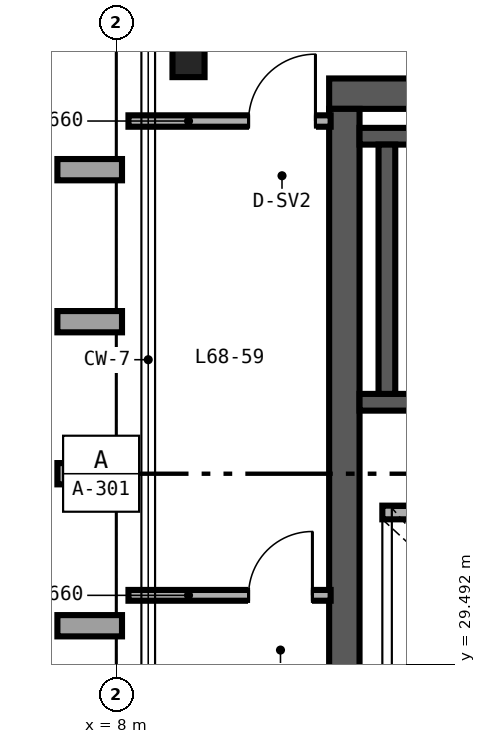
"""IFC4 building model, lengths in metres.
Left out: names, types, materials, properties, quantities, classifications, styles, units other than length and angle.
Written with IfcOpenShell. Run it as: python <this file> out.ifc"""

import sys

from ifc_helpers import new_model, si_unit, direction, frame, frame_2d, origin, origin_2d, place, context, subcontext, project, spatial, rectangle, i_section, extrude, source, transform, mapped, element, fill, save


model = new_model("IFC4")
c1 = context("Model", 3, precision=1e-05, world=origin(), true_north=direction((0.0, 1.0)))
c2 = subcontext(c1, "Body", "Model", "MODEL_VIEW")
j1 = project(units=[si_unit("LENGTHUNIT", "METRE"), si_unit("PLANEANGLEUNIT", "RADIAN")], contexts=[c1])
p1 = place(None, origin())
s1 = spatial("IfcSite", under=j1, at=p1, CompositionType="ELEMENT")
p2 = place(p1, origin())
s2 = spatial("IfcBuilding", under=s1, at=p2, CompositionType="ELEMENT")
p3 = place(p2, frame((0.0, 0.0, 268.8)))
s3 = spatial("IfcBuildingStorey", under=s2, at=p3, CompositionType="ELEMENT", Elevation=268.8)
p4 = place(p3, frame((10.8, 37.0, 0.0), z_axis=(0.0, 0.0, 1.0), x_axis=(1.0, 0.0, 0.0)))
e1 = element("IfcWall", 1, at=p4, inside=s3, PredefinedType="SHEAR", context=c2, shape_type="SweptSolid", body=[
    extrude(rectangle(XDim=12.4, YDim=0.4, at=frame_2d((6.2, 0.0))), origin(), (0.0, 0.0, 1.0), 3.28),
])
p5 = place(p4, frame((10.3, 0.0, 0.0)))
e2 = element("IfcOpeningElement", 2, at=p5, cuts=e1, PredefinedType="OPENING", context=c2, shape_type="SweptSolid", body=[
    extrude(rectangle(XDim=1.0, YDim=2.15, at=frame_2d((0.5, 1.075))), frame((0.0, 0.21, 0.0), z_axis=(0.0, -1.0, 0.0), x_axis=(1.0, 0.0, 0.0)), (0.0, 0.0, 1.0), 0.42),
])
p6 = place(p3, frame((11.0, 15.2, 0.0), z_axis=(0.0, 0.0, 1.0), x_axis=(0.0, 1.0, 0.0)))
e3 = element("IfcWall", 3, at=p6, inside=s3, PredefinedType="SHEAR", context=c2, shape_type="SweptSolid", body=[
    extrude(rectangle(XDim=21.6, YDim=0.4, at=frame_2d((10.8, 0.0))), origin(), (0.0, 0.0, 1.0), 3.28),
])
p7 = place(p3, frame((11.2, 32.94, 0.0), z_axis=(0.0, 0.0, 1.0), x_axis=(1.0, 0.0, 0.0)))
e4 = element("IfcWall", 4, at=p7, inside=s3, PredefinedType="SHEAR", context=c2, shape_type="SweptSolid", body=[
    extrude(rectangle(XDim=8.11, YDim=0.22, at=frame_2d((4.055, 0.0))), origin(), (0.0, 0.0, 1.0), 3.4),
])
p8 = place(p7, frame((0.72, 0.0, 0.0)))
e5 = element("IfcOpeningElement", 5, at=p8, cuts=e4, PredefinedType="OPENING", context=c2, shape_type="SweptSolid", body=[
    extrude(rectangle(XDim=1.05, YDim=2.15, at=frame_2d((0.525, 1.075))), frame((0.0, 0.12, 0.0), z_axis=(0.0, -1.0, 0.0), x_axis=(1.0, 0.0, 0.0)), (0.0, 0.0, 1.0), 0.24),
])
p9 = place(p3, frame((11.2, 36.44, 0.0), z_axis=(0.0, 0.0, 1.0), x_axis=(1.0, 0.0, 0.0)))
e6 = element("IfcWall", 6, at=p9, inside=s3, PredefinedType="SHEAR", context=c2, shape_type="SweptSolid", body=[
    extrude(rectangle(XDim=8.11, YDim=0.22, at=frame_2d((4.055, 0.0))), origin(), (0.0, 0.0, 1.0), 3.4),
])
p10 = place(p3, frame((11.56, 33.05, 0.0), z_axis=(0.0, 0.0, 1.0), x_axis=(0.0, 1.0, 0.0)))
e7 = element("IfcWall", 7, at=p10, inside=s3, PredefinedType="SHEAR", context=c2, shape_type="SweptSolid", body=[
    extrude(rectangle(XDim=3.28, YDim=0.22, at=frame_2d((1.64, 0.0))), origin(), (0.0, 0.0, 1.0), 3.4),
])
m1 = source(origin(), c2, "Body", "SweptSolid", [
    extrude(i_section(OverallWidth=0.422, OverallDepth=0.465, WebThickness=0.045, FlangeThickness=0.073, FilletRadius=0.025, at=origin_2d()), origin(), (0.0, 0.0, 1.0), 3.28),
])
p11 = place(p3, frame((8.95, 37.45, 0.0), z_axis=(0.0, 0.0, 1.0), x_axis=(1.0, 0.0, 0.0)))
e8 = element("IfcColumn", 8, at=p11, inside=s3, PredefinedType="COLUMN", context=c2, shape_type="MappedRepresentation", body=[
    mapped(m1, transform((0.0, 0.0, 0.0), scale=1.0)),
])
p12 = place(p3, frame((11.5, 31.49, 0.0), z_axis=(0.0, 0.0, 1.0), x_axis=(1.0, 0.0, 0.0)))
e9 = element("IfcWall", 9, at=p12, inside=s3, PredefinedType="SOLIDWALL", context=c2, shape_type="SweptSolid", body=[
    extrude(rectangle(XDim=2.5, YDim=0.18, at=frame_2d((1.25, 0.0))), origin(), (0.0, 0.0, 1.0), 3.28),
])
p13 = place(p3, frame((8.16, 36.64, 0.0), z_axis=(0.0, 0.0, 1.0), x_axis=(1.0, 0.0, 0.0)))
e10 = element("IfcWall", 10, at=p13, inside=s3, PredefinedType="PARTITIONING", context=c2, shape_type="SweptSolid", body=[
    extrude(rectangle(XDim=2.66, YDim=0.15, at=frame_2d((1.33, 0.0))), origin(), (0.0, 0.0, 1.0), 2.663),
])
p14 = place(p13, frame((1.58, 0.0, 0.0)))
e11 = element("IfcOpeningElement", 11, at=p14, cuts=e10, PredefinedType="OPENING", context=c2, shape_type="SweptSolid", body=[
    extrude(rectangle(XDim=0.88, YDim=2.15, at=frame_2d((0.44, 1.075))), frame((0.0, 0.085, 0.0), z_axis=(0.0, -1.0, 0.0), x_axis=(1.0, 0.0, 0.0)), (0.0, 0.0, 1.0), 0.17),
])
p15 = place(p3, frame((8.16, 30.4, 0.0), z_axis=(0.0, 0.0, 1.0), x_axis=(1.0, 0.0, 0.0)))
e12 = element("IfcWall", 12, at=p15, inside=s3, PredefinedType="PARTITIONING", context=c2, shape_type="SweptSolid", body=[
    extrude(rectangle(XDim=2.66, YDim=0.142, at=frame_2d((1.33, 0.0))), origin(), (0.0, 0.0, 1.0), 2.663),
])
p16 = place(p15, frame((1.58, 0.0, 0.0)))
e13 = element("IfcOpeningElement", 13, at=p16, cuts=e12, PredefinedType="OPENING", context=c2, shape_type="SweptSolid", body=[
    extrude(rectangle(XDim=0.84, YDim=2.1, at=frame_2d((0.42, 1.05))), frame((0.0, 0.081, 0.0), z_axis=(0.0, -1.0, 0.0), x_axis=(1.0, 0.0, 0.0)), (0.0, 0.0, 1.0), 0.162),
])
m2 = source(origin(), c2, "Body", "SweptSolid", [
    extrude(rectangle(XDim=0.88, YDim=2.15, at=frame_2d((0.44, 1.075))), frame((0.0, 0.025, 0.0), z_axis=(0.0, -1.0, 0.0), x_axis=(1.0, 0.0, 0.0)), (0.0, 0.0, 1.0), 0.05),
])
p17 = place(p14, origin())
e14 = element("IfcDoor", 14, at=p17, inside=s3, OperationType="SINGLE_SWING_RIGHT", PredefinedType="DOOR", context=c2, shape_type="MappedRepresentation", body=[
    mapped(m2, transform((0.0, 0.0, 0.0), scale=1.0)),
])
fill(e11, e14)
m3 = source(origin(), c2, "Body", "SweptSolid", [
    extrude(rectangle(XDim=0.84, YDim=2.1, at=frame_2d((0.42, 1.05))), frame((0.0, 0.025, 0.0), z_axis=(0.0, -1.0, 0.0), x_axis=(1.0, 0.0, 0.0)), (0.0, 0.0, 1.0), 0.05),
])
p18 = place(p16, origin())
e15 = element("IfcDoor", 15, at=p18, inside=s3, OperationType="SINGLE_SWING_RIGHT", PredefinedType="DOOR", context=c2, shape_type="MappedRepresentation", body=[
    mapped(m3, transform((0.0, 0.0, 0.0), scale=1.0)),
])
fill(e13, e15)
save(model, sys.argv[1])
